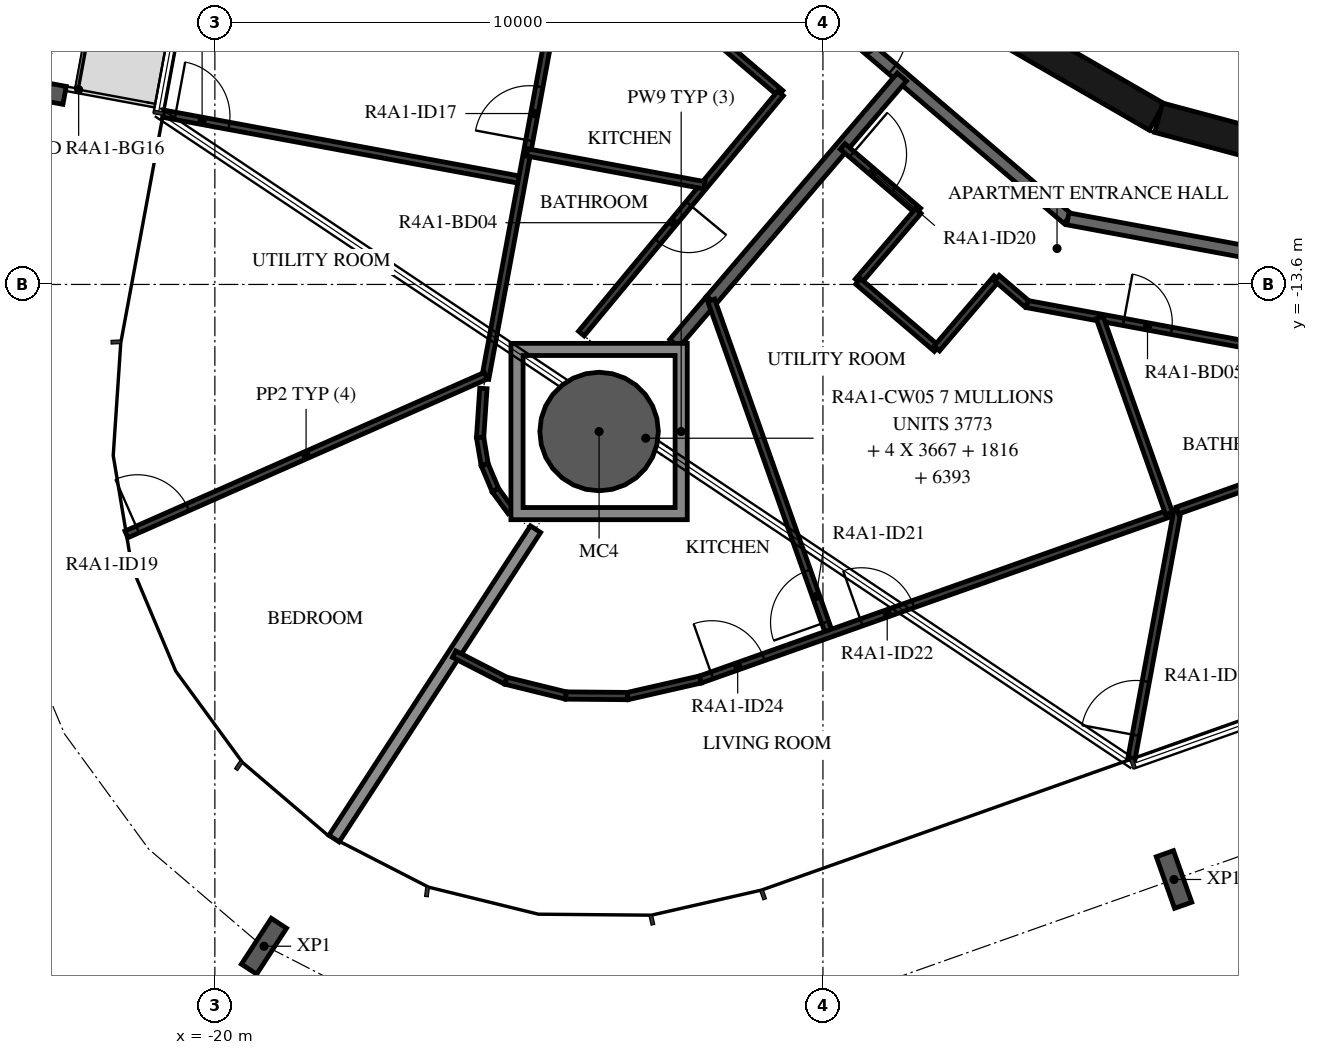
"""IFC4 building model, lengths in metres.
Left out: names, types, materials, properties, quantities, classifications, styles, units other than length and angle.
Written with IfcOpenShell. Run it as: python <this file> out.ifc"""

import sys

from ifc_helpers import new_model, si_unit, direction, frame, frame_2d, origin, origin_2d, place, context, subcontext, project, spatial, polyline, rectangle, hollow_circle, i_section, outline, extrude, element, fill, save


model = new_model("IFC4")
c1 = context("Model", 3, precision=1e-05, world=origin(), true_north=direction((0.0, 1.0)))
c2 = subcontext(c1, "Body", "Model", "MODEL_VIEW")
j1 = project(units=[si_unit("LENGTHUNIT", "METRE"), si_unit("PLANEANGLEUNIT", "RADIAN")], contexts=[c1])
p1 = place(None, origin())
s1 = spatial("IfcSite", under=j1, at=p1, CompositionType="ELEMENT")
p2 = place(p1, origin())
s2 = spatial("IfcBuilding", under=s1, at=p2, CompositionType="ELEMENT")
p3 = place(p2, frame((0.0, 0.0, 155.2)))
s3 = spatial("IfcBuildingStorey", under=s2, at=p3, CompositionType="ELEMENT", Elevation=155.2)
p4 = place(p3, frame((-13.681, -16.019, -0.38), z_axis=(0.0, 0.0, 1.0), x_axis=(1.0, 0.0, 0.0)))
e1 = element("IfcColumn", 1, at=p4, inside=s3, PredefinedType="COLUMN", context=c2, shape_type="SweptSolid", body=[
    extrude(hollow_circle(Radius=0.975, WallThickness=0.045, at=origin_2d()), origin(), (0.0, 0.0, 1.0), 3.5),
])
for number, where, z_axis, x_axis in (
    (2, (-22.914, -10.409, -0.38), (0.0, 0.0, 1.0), (0.182, 0.983, 0.0)),
    (3, (-19.192, -24.483, -0.38), (0.0, 0.0, 1.0), (-0.838, 0.546, 0.0)),
    (4, (-4.226, -23.385, -0.38), (0.0, 0.0, 1.0), (-0.943, -0.334, 0.0)),
):
    element("IfcColumn", number, at=place(p3, frame(where, z_axis=z_axis, x_axis=x_axis)), inside=s3, PredefinedType="COLUMN", context=c2, shape_type="SweptSolid", body=[
        extrude(i_section(OverallWidth=0.3, OverallDepth=0.9, WebThickness=0.019, FlangeThickness=0.035, FilletRadius=0.03, at=origin_2d()), origin(), (0.0, 0.0, 1.0), 3.5),
    ])
for number, where, z_axis, x_axis in (
    (5, (-7.137, -9.329, 0.0), (0.0, 0.0, 1.0), (0.866, -0.5, 0.0)),
    (6, (-4.479, -10.858, 0.0), (0.0, 0.0, 1.0), (0.966, -0.259, 0.0)),
):
    element("IfcWall", number, at=place(p3, frame(where, z_axis=z_axis, x_axis=x_axis)), inside=s3, PredefinedType="SHEAR", context=c2, shape_type="SweptSolid", body=[
        extrude(rectangle(XDim=3.033, YDim=0.5, at=frame_2d((1.516, 0.0))), origin(), (0.0, 0.0, 1.0), 3.12),
    ])
p5 = place(p3, frame((-11.433, -7.858, 0.0), z_axis=(0.0, 0.0, 1.0), x_axis=(0.760412154545, -0.649440801937, 0.0)))
e7 = element("IfcWall", 7, at=p5, inside=s3, PredefinedType="STANDARD", context=c2, shape_type="SweptSolid", body=[
    extrude(rectangle(XDim=7.181, YDim=0.2, at=frame_2d((3.59, 0.0))), origin(), (0.0, 0.0, 1.0), 3.12),
])
p6 = place(p5, frame((2.39, 0.0, 0.0)))
e8 = element("IfcOpeningElement", 8, at=p6, cuts=e7, PredefinedType="OPENING", context=c2, shape_type="SweptSolid", body=[
    extrude(rectangle(XDim=1.0, YDim=2.1, at=frame_2d((0.5, 1.05))), frame((0.0, 0.11, 0.0), z_axis=(0.0, -1.0, 0.0), x_axis=(1.0, 0.0, 0.0)), (0.0, 0.0, 1.0), 0.22),
])
p7 = place(p3, frame((-5.972, -12.521, 0.0), z_axis=(0.0, 0.0, 1.0), x_axis=(0.983256068163, -0.18222926335, 0.0)))
e9 = element("IfcWall", 9, at=p7, inside=s3, PredefinedType="STANDARD", context=c2, shape_type="SweptSolid", body=[
    extrude(rectangle(XDim=7.181, YDim=0.2, at=frame_2d((3.59, 0.0))), origin(), (0.0, 0.0, 1.0), 3.12),
])
p8 = place(p7, frame((4.7, 0.0, 0.0)))
e10 = element("IfcOpeningElement", 10, at=p8, cuts=e9, PredefinedType="OPENING", context=c2, shape_type="SweptSolid", body=[
    extrude(rectangle(XDim=1.0, YDim=2.1, at=frame_2d((0.5, 1.05))), frame((0.0, 0.11, 0.0), z_axis=(0.0, -1.0, 0.0), x_axis=(1.0, 0.0, 0.0)), (0.0, 0.0, 1.0), 0.22),
])
p9 = place(p3, frame((-11.838, -13.86, 0.0), z_axis=(0.0, 0.0, 1.0), x_axis=(0.64944503311, 0.760408540831, 0.0)))
e11 = element("IfcWall", 11, at=p9, inside=s3, PredefinedType="STANDARD", context=c2, shape_type="SweptSolid", body=[
    extrude(rectangle(XDim=4.827, YDim=0.2, at=frame_2d((2.414, 0.0))), origin(), (0.0, 0.0, 1.0), 3.12),
])
p10 = place(p3, frame((-12.443, -14.569, 0.0), z_axis=(0.0, 0.0, 1.0), x_axis=(0.649517408851, 0.760346720648, 0.0)))
e12 = element("IfcWall", 12, at=p10, inside=s3, PredefinedType="STANDARD", context=c2, shape_type="SweptSolid", body=[
    extrude(rectangle(XDim=0.932, YDim=0.2, at=frame_2d((0.466, 0.0))), origin(), (0.0, 0.0, 1.0), 3.12),
])
p11 = place(p3, frame((-18.04, -22.713, 0.0), z_axis=(0.0, 0.0, 1.0), x_axis=(0.545629831617, 0.83802630439, 0.0)))
e13 = element("IfcWall", 13, at=p11, inside=s3, PredefinedType="STANDARD", context=c2, shape_type="SweptSolid", body=[
    extrude(rectangle(XDim=6.072, YDim=0.2, at=frame_2d((3.036, 0.0))), origin(), (0.0, 0.0, 1.0), 2.73),
])
p12 = place(p3, frame((-12.713, -8.737, 0.0), z_axis=(0.0, 0.0, 1.0), x_axis=(0.760400223405, -0.649454771517, 0.0)))
e14 = element("IfcWall", 14, at=p12, inside=s3, PredefinedType="PARTITIONING", context=c2, shape_type="SweptSolid", body=[
    extrude(rectangle(XDim=2.649, YDim=0.12, at=frame_2d((1.325, 0.0))), origin(), (0.0, 0.0, 1.0), 3.12),
])
p13 = place(p3, frame((-10.698, -10.458, 0.0), z_axis=(0.0, 0.0, 1.0), x_axis=(-0.63830561059, -0.769783052223, 0.0)))
e15 = element("IfcWall", 15, at=p13, inside=s3, PredefinedType="PARTITIONING", context=c2, shape_type="SweptSolid", body=[
    extrude(rectangle(XDim=5.131, YDim=0.12, at=frame_2d((2.565, 0.0))), origin(), (0.0, 0.0, 1.0), 3.12),
])
p14 = place(p13, frame((2.363, 0.0, 0.0)))
e16 = element("IfcOpeningElement", 16, at=p14, cuts=e15, PredefinedType="OPENING", context=c2, shape_type="SweptSolid", body=[
    extrude(rectangle(XDim=0.8, YDim=2.1, at=frame_2d((0.4, 1.05))), frame((0.0, 0.07, 0.0), z_axis=(0.0, -1.0, 0.0), x_axis=(1.0, 0.0, 0.0)), (0.0, 0.0, 1.0), 0.14),
])
p15 = place(p3, frame((-20.849, -10.792, 0.0), z_axis=(0.0, 0.0, 1.0), x_axis=(0.983251500113, -0.182253909494, 0.0)))
e17 = element("IfcWall", 17, at=p15, inside=s3, PredefinedType="PARTITIONING", context=c2, shape_type="SweptSolid", body=[
    extrude(rectangle(XDim=6.0, YDim=0.12, at=frame_2d((3.0, 0.0))), origin(), (0.0, 0.0, 1.0), 2.73),
])
p16 = place(p15, frame((0.2, 0.0, 0.0)))
e18 = element("IfcOpeningElement", 18, at=p16, cuts=e17, PredefinedType="OPENING", context=c2, shape_type="SweptSolid", body=[
    extrude(rectangle(XDim=0.9, YDim=2.1, at=frame_2d((0.45, 1.05))), frame((0.0, 0.07, 0.0), z_axis=(0.0, -1.0, 0.0), x_axis=(1.0, 0.0, 0.0)), (0.0, 0.0, 1.0), 0.14),
])
p17 = place(p3, frame((-15.554, -15.149, 0.0), z_axis=(0.0, 0.0, 1.0), x_axis=(0.182237116667, 0.983254612656, 0.0)))
e19 = element("IfcWall", 19, at=p17, inside=s3, PredefinedType="PARTITIONING", context=c2, shape_type="SweptSolid", body=[
    extrude(rectangle(XDim=9.638, YDim=0.12, at=frame_2d((4.819, 0.0))), origin(), (0.0, 0.0, 1.0), 3.12),
])
p18 = place(p17, frame((3.984, 0.0, 0.0)))
e20 = element("IfcOpeningElement", 20, at=p18, cuts=e19, PredefinedType="OPENING", context=c2, shape_type="SweptSolid", body=[
    extrude(rectangle(XDim=0.9, YDim=2.1, at=frame_2d((0.45, 1.05))), frame((0.0, 0.07, 0.0), z_axis=(0.0, -1.0, 0.0), x_axis=(1.0, 0.0, 0.0)), (0.0, 0.0, 1.0), 0.14),
])
p19 = place(p3, frame((-21.455, -17.71, 0.0), z_axis=(0.0, 0.0, 1.0), x_axis=(0.914829518237, 0.403840256243, 0.0)))
e21 = element("IfcWall", 21, at=p19, inside=s3, PredefinedType="PARTITIONING", context=c2, shape_type="SweptSolid", body=[
    extrude(rectangle(XDim=6.459, YDim=0.12, at=frame_2d((3.23, 0.0))), origin(), (0.0, 0.0, 1.0), 2.73),
])
p20 = place(p19, frame((0.2, 0.0, 0.0)))
e22 = element("IfcOpeningElement", 22, at=p20, cuts=e21, PredefinedType="OPENING", context=c2, shape_type="SweptSolid", body=[
    extrude(rectangle(XDim=0.9, YDim=2.1, at=frame_2d((0.45, 1.05))), frame((0.0, 0.07, 0.0), z_axis=(0.0, -1.0, 0.0), x_axis=(1.0, 0.0, 0.0)), (0.0, 0.0, 1.0), 0.14),
])
p21 = place(p3, frame((-14.865, -11.428, 0.0), z_axis=(0.0, 0.0, 1.0), x_axis=(0.983255224962, -0.182233812955, 0.0)))
e23 = element("IfcWall", 23, at=p21, inside=s3, PredefinedType="PARTITIONING", context=c2, shape_type="SweptSolid", body=[
    extrude(rectangle(XDim=2.963, YDim=0.12, at=frame_2d((1.482, 0.0))), origin(), (0.0, 0.0, 1.0), 3.12),
])
p22 = place(p3, frame((-15.584, -15.311, 0.0), z_axis=(0.0, 0.0, 1.0), x_axis=(-0.066880551605, -0.997760989324, 0.0)))
e24 = element("IfcWall", 24, at=p22, inside=s3, PredefinedType="PARTITIONING", context=c2, shape_type="SweptSolid", body=[
    extrude(rectangle(XDim=0.807, YDim=0.12, at=frame_2d((0.403, 0.0))), origin(), (0.0, 0.0, 1.0), 3.12),
])
for number, where, z_axis, x_axis in (
    (25, (-15.638, -16.115, 0.0), (0.0, 0.0, 1.0), (0.165, -0.986, 0.0)),
    (26, (-15.563, -16.564, 0.0), (0.0, 0.0, 1.0), (0.389, -0.921, 0.0)),
):
    element("IfcWall", number, at=place(p3, frame(where, z_axis=z_axis, x_axis=x_axis)), inside=s3, PredefinedType="PARTITIONING", context=c2, shape_type="SweptSolid", body=[
        extrude(rectangle(XDim=0.455, YDim=0.12, at=frame_2d((0.228, 0.0))), origin(), (0.0, 0.0, 1.0), 3.12),
    ])
p23 = place(p3, frame((-15.386, -16.983, 0.0), z_axis=(0.0, 0.0, 1.0), x_axis=(0.590016589342, -0.807391122258, 0.0)))
e27 = element("IfcWall", 27, at=p23, inside=s3, PredefinedType="PARTITIONING", context=c2, shape_type="SweptSolid", body=[
    extrude(rectangle(XDim=0.432, YDim=0.12, at=frame_2d((0.216, 0.0))), origin(), (0.0, 0.0, 1.0), 3.12),
])
p24 = place(p3, frame((-9.677, -11.33, 0.0), z_axis=(0.0, 0.0, 1.0), x_axis=(0.760372142735, -0.649487647729, 0.0)))
e28 = element("IfcWall", 28, at=p24, inside=s3, PredefinedType="PARTITIONING", context=c2, shape_type="SweptSolid", body=[
    extrude(rectangle(XDim=1.636, YDim=0.12, at=frame_2d((0.818, 0.0))), origin(), (0.0, 0.0, 1.0), 3.12),
])
p25 = place(p24, frame((0.2, 0.0, 0.0)))
e29 = element("IfcOpeningElement", 29, at=p25, cuts=e28, PredefinedType="OPENING", context=c2, shape_type="SweptSolid", body=[
    extrude(rectangle(XDim=0.9, YDim=2.1, at=frame_2d((0.45, 1.05))), frame((0.0, 0.07, 0.0), z_axis=(0.0, -1.0, 0.0), x_axis=(1.0, 0.0, 0.0)), (0.0, 0.0, 1.0), 0.14),
])
p26 = place(p3, frame((-8.433, -12.393, 0.0), z_axis=(0.0, 0.0, 1.0), x_axis=(-0.649443355674, -0.760409973482, 0.0)))
e30 = element("IfcWall", 30, at=p26, inside=s3, PredefinedType="PARTITIONING", context=c2, shape_type="SweptSolid", body=[
    extrude(rectangle(XDim=1.522, YDim=0.12, at=frame_2d((0.761, 0.0))), origin(), (0.0, 0.0, 1.0), 3.12),
])
p27 = place(p3, frame((-9.422, -13.55, 0.0), z_axis=(0.0, 0.0, 1.0), x_axis=(0.760431300628, -0.649418383652, 0.0)))
e31 = element("IfcWall", 31, at=p27, inside=s3, PredefinedType="PARTITIONING", context=c2, shape_type="SweptSolid", body=[
    extrude(rectangle(XDim=1.7, YDim=0.12, at=frame_2d((0.85, 0.0))), origin(), (0.0, 0.0, 1.0), 3.12),
])
p28 = place(p3, frame((-8.129, -14.654, 0.0), z_axis=(0.0, 0.0, 1.0), x_axis=(0.649443355674, 0.760409973482, 0.0)))
e32 = element("IfcWall", 32, at=p28, inside=s3, PredefinedType="PARTITIONING", context=c2, shape_type="SweptSolid", body=[
    extrude(rectangle(XDim=1.522, YDim=0.12, at=frame_2d((0.761, 0.0))), origin(), (0.0, 0.0, 1.0), 3.12),
])
p29 = place(p3, frame((-7.14, -13.497, 0.0), z_axis=(0.0, 0.0, 1.0), x_axis=(0.760515230334, -0.649320093967, 0.0)))
e33 = element("IfcWall", 33, at=p29, inside=s3, PredefinedType="PARTITIONING", context=c2, shape_type="SweptSolid", body=[
    extrude(rectangle(XDim=0.656, YDim=0.12, at=frame_2d((0.328, 0.0))), origin(), (0.0, 0.0, 1.0), 3.12),
])
p30 = place(p3, frame((-6.641, -13.923, 0.0), z_axis=(0.0, 0.0, 1.0), x_axis=(0.983250157272, -0.182261153912, 0.0)))
e34 = element("IfcWall", 34, at=p30, inside=s3, PredefinedType="PARTITIONING", context=c2, shape_type="SweptSolid", body=[
    extrude(rectangle(XDim=7.985, YDim=0.12, at=frame_2d((3.992, 0.0))), origin(), (0.0, 0.0, 1.0), 3.12),
])
p31 = place(p30, frame((1.612, 0.0, 0.0)))
e35 = element("IfcOpeningElement", 35, at=p31, cuts=e34, PredefinedType="OPENING", context=c2, shape_type="SweptSolid", body=[
    extrude(rectangle(XDim=0.8, YDim=2.1, at=frame_2d((0.4, 1.05))), frame((0.0, 0.07, 0.0), z_axis=(0.0, -1.0, 0.0), x_axis=(1.0, 0.0, 0.0)), (0.0, 0.0, 1.0), 0.14),
])
p32 = place(p3, frame((-9.895, -19.346, 0.0), z_axis=(0.0, 0.0, 1.0), x_axis=(-0.333781129158, 0.942650602195, 0.0)))
e36 = element("IfcWall", 36, at=p32, inside=s3, PredefinedType="PARTITIONING", context=c2, shape_type="SweptSolid", body=[
    extrude(rectangle(XDim=5.819, YDim=0.12, at=frame_2d((2.91, 0.0))), origin(), (0.0, 0.0, 1.0), 3.12),
])
p33 = place(p32, frame((0.2, 0.0, 0.0)))
e37 = element("IfcOpeningElement", 37, at=p33, cuts=e36, PredefinedType="OPENING", context=c2, shape_type="SweptSolid", body=[
    extrude(rectangle(XDim=0.9, YDim=2.1, at=frame_2d((0.45, 1.05))), frame((0.0, 0.07, 0.0), z_axis=(0.0, -1.0, 0.0), x_axis=(1.0, 0.0, 0.0)), (0.0, 0.0, 1.0), 0.14),
])
p34 = place(p3, frame((-16.065, -19.68, 0.0), z_axis=(0.0, 0.0, 1.0), x_axis=(0.889684645268, -0.456575549033, 0.0)))
e38 = element("IfcWall", 38, at=p34, inside=s3, PredefinedType="PARTITIONING", context=c2, shape_type="SweptSolid", body=[
    extrude(rectangle(XDim=0.957, YDim=0.12, at=frame_2d((0.479, 0.0))), origin(), (0.0, 0.0, 1.0), 3.12),
])
p35 = place(p3, frame((-15.214, -20.117, 0.0), z_axis=(0.0, 0.0, 1.0), x_axis=(0.970998575146, -0.239085271534, 0.0)))
e39 = element("IfcWall", 39, at=p35, inside=s3, PredefinedType="PARTITIONING", context=c2, shape_type="SweptSolid", body=[
    extrude(rectangle(XDim=1.016, YDim=0.12, at=frame_2d((0.508, 0.0))), origin(), (0.0, 0.0, 1.0), 3.12),
])
p36 = place(p3, frame((-14.227, -20.36, 0.0), z_axis=(0.0, 0.0, 1.0), x_axis=(0.999960467683, -0.008891741722, 0.0)))
e40 = element("IfcWall", 40, at=p36, inside=s3, PredefinedType="PARTITIONING", context=c2, shape_type="SweptSolid", body=[
    extrude(rectangle(XDim=1.016, YDim=0.12, at=frame_2d((0.508, 0.0))), origin(), (0.0, 0.0, 1.0), 3.12),
])
p37 = place(p3, frame((-13.211, -20.369, 0.0), z_axis=(0.0, 0.0, 1.0), x_axis=(0.974997834831, 0.222214360642, 0.0)))
e41 = element("IfcWall", 41, at=p37, inside=s3, PredefinedType="PARTITIONING", context=c2, shape_type="SweptSolid", body=[
    extrude(rectangle(XDim=1.227, YDim=0.12, at=frame_2d((0.614, 0.0))), origin(), (0.0, 0.0, 1.0), 3.12),
])
p38 = place(p3, frame((-12.015, -20.096, 0.0), z_axis=(0.0, 0.0, 1.0), x_axis=(0.942638718556, 0.333814688531, 0.0)))
e42 = element("IfcWall", 42, at=p38, inside=s3, PredefinedType="PARTITIONING", context=c2, shape_type="SweptSolid", body=[
    extrude(rectangle(XDim=8.216, YDim=0.12, at=frame_2d((4.108, 0.0))), origin(), (0.0, 0.0, 1.0), 3.12),
])
p39 = place(p38, frame((2.809, 0.0, 0.0)))
e43 = element("IfcOpeningElement", 43, at=p39, cuts=e42, PredefinedType="OPENING", context=c2, shape_type="SweptSolid", body=[
    extrude(rectangle(XDim=0.9, YDim=2.1, at=frame_2d((0.45, 1.05))), frame((0.0, 0.07, 0.0), z_axis=(0.0, -1.0, 0.0), x_axis=(1.0, 0.0, 0.0)), (0.0, 0.0, 1.0), 0.14),
])
p40 = place(p38, frame((0.2, 0.0, 0.0)))
e44 = element("IfcOpeningElement", 44, at=p40, cuts=e42, PredefinedType="OPENING", context=c2, shape_type="SweptSolid", body=[
    extrude(rectangle(XDim=0.9, YDim=2.1, at=frame_2d((0.45, 1.05))), frame((0.0, 0.07, 0.0), z_axis=(0.0, -1.0, 0.0), x_axis=(1.0, 0.0, 0.0)), (0.0, 0.0, 1.0), 0.14),
])
p41 = place(p3, frame((-4.308, -17.367, 0.0), z_axis=(0.0, 0.0, 1.0), x_axis=(-0.333802202677, 0.942643140052, 0.0)))
e45 = element("IfcWall", 45, at=p41, inside=s3, PredefinedType="PARTITIONING", context=c2, shape_type="SweptSolid", body=[
    extrude(rectangle(XDim=3.419, YDim=0.12, at=frame_2d((1.709, 0.0))), origin(), (0.0, 0.0, 1.0), 3.12),
])
p42 = place(p3, frame((-4.927, -21.406, 0.0), z_axis=(0.0, 0.0, 1.0), x_axis=(0.182238575099, 0.983254342348, 0.0)))
e46 = element("IfcWall", 46, at=p42, inside=s3, PredefinedType="PARTITIONING", context=c2, shape_type="SweptSolid", body=[
    extrude(rectangle(XDim=4.157, YDim=0.12, at=frame_2d((2.079, 0.0))), origin(), (0.0, 0.0, 1.0), 3.12),
])
p43 = place(p42, frame((0.4, 0.0, 0.0)))
e47 = element("IfcOpeningElement", 47, at=p43, cuts=e46, PredefinedType="OPENING", context=c2, shape_type="SweptSolid", body=[
    extrude(rectangle(XDim=0.9, YDim=2.1, at=frame_2d((0.45, 1.05))), frame((0.0, 0.07, 0.0), z_axis=(0.0, -1.0, 0.0), x_axis=(1.0, 0.0, 0.0)), (0.0, 0.0, 1.0), 0.14),
])
p44 = place(p3, frame((-4.17, -17.318, 0.0), z_axis=(0.0, 0.0, 1.0), x_axis=(0.942641343532, 0.333807275931, 0.0)))
e48 = element("IfcWall", 48, at=p44, inside=s3, PredefinedType="PARTITIONING", context=c2, shape_type="SweptSolid", body=[
    extrude(rectangle(XDim=5.781, YDim=0.12, at=frame_2d((2.891, 0.0))), origin(), (0.0, 0.0, 1.0), 3.12),
])
p45 = place(p3, origin())
e49 = element("IfcWall", 49, at=p45, inside=s3, PredefinedType="STANDARD", context=c2, shape_type="SweptSolid", body=[
    extrude(outline(polyline([(-12.231, -14.569), (-12.231, -17.469), (-15.131, -17.469), (-15.131, -14.569), (-12.231, -14.569)]), holes=[polyline([(-14.931, -17.269), (-12.431, -17.269), (-12.431, -14.769), (-14.931, -14.769), (-14.931, -17.269)])]), origin(), (0.0, 0.0, 1.0), 3.12),
])
p46 = place(p6, origin())
e50 = element("IfcDoor", 50, at=p46, inside=s3, OperationType="SINGLE_SWING_RIGHT", PredefinedType="DOOR", context=c2, shape_type="SweptSolid", body=[
    extrude(rectangle(XDim=1.0, YDim=2.1, at=frame_2d((0.5, 1.05))), frame((0.0, 0.025, 0.0), z_axis=(0.0, -1.0, 0.0), x_axis=(1.0, 0.0, 0.0)), (0.0, 0.0, 1.0), 0.05),
])
fill(e8, e50)
p47 = place(p14, origin())
e51 = element("IfcDoor", 51, at=p47, inside=s3, OperationType="SINGLE_SWING_RIGHT", PredefinedType="DOOR", context=c2, shape_type="SweptSolid", body=[
    extrude(rectangle(XDim=0.8, YDim=2.1, at=frame_2d((0.4, 1.05))), frame((0.0, 0.025, 0.0), z_axis=(0.0, -1.0, 0.0), x_axis=(1.0, 0.0, 0.0)), (0.0, 0.0, 1.0), 0.05),
])
fill(e16, e51)
p48 = place(p18, origin())
e52 = element("IfcDoor", 52, at=p48, inside=s3, OperationType="SINGLE_SWING_RIGHT", PredefinedType="DOOR", context=c2, shape_type="SweptSolid", body=[
    extrude(rectangle(XDim=0.9, YDim=2.1, at=frame_2d((0.45, 1.05))), frame((0.0, 0.025, 0.0), z_axis=(0.0, -1.0, 0.0), x_axis=(1.0, 0.0, 0.0)), (0.0, 0.0, 1.0), 0.05),
])
fill(e20, e52)
p49 = place(p16, origin())
e53 = element("IfcDoor", 53, at=p49, inside=s3, OperationType="SINGLE_SWING_RIGHT", PredefinedType="DOOR", context=c2, shape_type="SweptSolid", body=[
    extrude(rectangle(XDim=0.9, YDim=2.1, at=frame_2d((0.45, 1.05))), frame((0.0, 0.025, 0.0), z_axis=(0.0, -1.0, 0.0), x_axis=(1.0, 0.0, 0.0)), (0.0, 0.0, 1.0), 0.05),
])
fill(e18, e53)
p50 = place(p20, origin())
e54 = element("IfcDoor", 54, at=p50, inside=s3, OperationType="SINGLE_SWING_RIGHT", PredefinedType="DOOR", context=c2, shape_type="SweptSolid", body=[
    extrude(rectangle(XDim=0.9, YDim=2.1, at=frame_2d((0.45, 1.05))), frame((0.0, 0.025, 0.0), z_axis=(0.0, -1.0, 0.0), x_axis=(1.0, 0.0, 0.0)), (0.0, 0.0, 1.0), 0.05),
])
fill(e22, e54)
p51 = place(p25, origin())
e55 = element("IfcDoor", 55, at=p51, inside=s3, OperationType="SINGLE_SWING_LEFT", PredefinedType="DOOR", context=c2, shape_type="SweptSolid", body=[
    extrude(rectangle(XDim=0.9, YDim=2.1, at=frame_2d((0.45, 1.05))), frame((0.0, 0.025, 0.0), z_axis=(0.0, -1.0, 0.0), x_axis=(1.0, 0.0, 0.0)), (0.0, 0.0, 1.0), 0.05),
])
fill(e29, e55)
p52 = place(p31, origin())
e56 = element("IfcDoor", 56, at=p52, inside=s3, OperationType="SINGLE_SWING_LEFT", PredefinedType="DOOR", context=c2, shape_type="SweptSolid", body=[
    extrude(rectangle(XDim=0.8, YDim=2.1, at=frame_2d((0.4, 1.05))), frame((0.0, 0.025, 0.0), z_axis=(0.0, -1.0, 0.0), x_axis=(1.0, 0.0, 0.0)), (0.0, 0.0, 1.0), 0.05),
])
fill(e35, e56)
p53 = place(p33, origin())
e57 = element("IfcDoor", 57, at=p53, inside=s3, OperationType="SINGLE_SWING_LEFT", PredefinedType="DOOR", context=c2, shape_type="SweptSolid", body=[
    extrude(rectangle(XDim=0.9, YDim=2.1, at=frame_2d((0.45, 1.05))), frame((0.0, 0.025, 0.0), z_axis=(0.0, -1.0, 0.0), x_axis=(1.0, 0.0, 0.0)), (0.0, 0.0, 1.0), 0.05),
])
fill(e37, e57)
p54 = place(p39, origin())
e58 = element("IfcDoor", 58, at=p54, inside=s3, OperationType="SINGLE_SWING_LEFT", PredefinedType="DOOR", context=c2, shape_type="SweptSolid", body=[
    extrude(rectangle(XDim=0.9, YDim=2.1, at=frame_2d((0.45, 1.05))), frame((0.0, 0.025, 0.0), z_axis=(0.0, -1.0, 0.0), x_axis=(1.0, 0.0, 0.0)), (0.0, 0.0, 1.0), 0.05),
])
fill(e43, e58)
p55 = place(p43, origin())
e59 = element("IfcDoor", 59, at=p55, inside=s3, OperationType="SINGLE_SWING_RIGHT", PredefinedType="DOOR", context=c2, shape_type="SweptSolid", body=[
    extrude(rectangle(XDim=0.9, YDim=2.1, at=frame_2d((0.45, 1.05))), frame((0.0, 0.025, 0.0), z_axis=(0.0, -1.0, 0.0), x_axis=(1.0, 0.0, 0.0)), (0.0, 0.0, 1.0), 0.05),
])
fill(e47, e59)
p56 = place(p40, origin())
e60 = element("IfcDoor", 60, at=p56, inside=s3, OperationType="SINGLE_SWING_LEFT", PredefinedType="DOOR", context=c2, shape_type="SweptSolid", body=[
    extrude(rectangle(XDim=0.9, YDim=2.1, at=frame_2d((0.45, 1.05))), frame((0.0, 0.025, 0.0), z_axis=(0.0, -1.0, 0.0), x_axis=(1.0, 0.0, 0.0)), (0.0, 0.0, 1.0), 0.05),
])
fill(e44, e60)
save(model, sys.argv[1])
